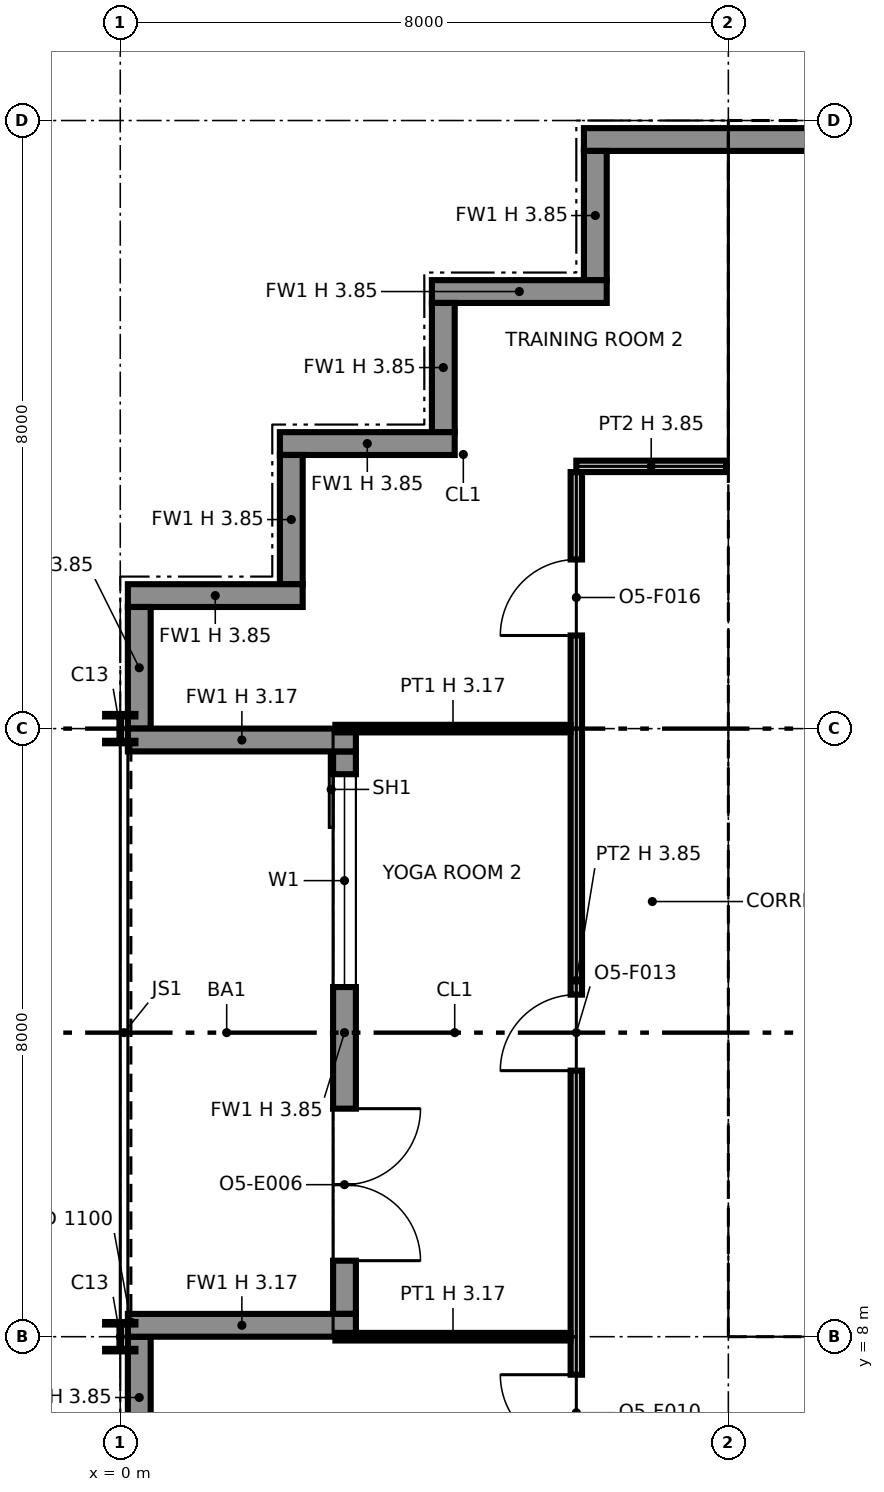
"""IFC4 building model, lengths in metres.
Left out: names, types, materials, properties, quantities, classifications, styles, units other than length and angle.
Written with IfcOpenShell. Run it as: python <this file> out.ifc"""

import sys

from ifc_helpers import new_model, si_unit, direction, frame, frame_2d, origin, origin_2d, place, context, subcontext, project, spatial, polyline, rectangle, i_section, outline, extrude, element, fill, save


model = new_model("IFC4")
c1 = context("Model", 3, precision=1e-05, world=origin(), true_north=direction((0.0, 1.0)))
c2 = subcontext(c1, "Body", "Model", "MODEL_VIEW")
j1 = project(units=[si_unit("LENGTHUNIT", "METRE"), si_unit("PLANEANGLEUNIT", "RADIAN")], contexts=[c1])
p1 = place(None, origin())
s1 = spatial("IfcSite", under=j1, at=p1, CompositionType="ELEMENT")
p2 = place(p1, origin())
s2 = spatial("IfcBuilding", under=s1, at=p2, CompositionType="ELEMENT")
p3 = place(p2, frame((0.0, 0.0, 225.0)))
s3 = spatial("IfcBuildingStorey", under=s2, at=p3, CompositionType="ELEMENT", Elevation=225.0)
for number, where, z_axis, x_axis in (
    (1, (0.0, 8.0, 0.0), (0.0, 0.0, 1.0), (1.0, 0.0, 0.0)),
    (2, (0.0, 16.0, 0.0), (0.0, 0.0, 1.0), (1.0, 0.0, 0.0)),
):
    element("IfcColumn", number, at=place(p3, frame(where, z_axis=z_axis, x_axis=x_axis)), inside=s3, PredefinedType="COLUMN", context=c2, shape_type="SweptSolid", body=[
        extrude(i_section(OverallWidth=0.399, OverallDepth=0.386, WebThickness=0.021, FlangeThickness=0.033, at=origin_2d()), origin(), (0.0, 0.0, 1.0), 3.85),
    ])
for number, where, z_axis, x_axis in (
    (3, (8.0, 8.0, 0.0), (0.0, 0.0, 1.0), (1.0, 0.0, 0.0)),
    (4, (8.0, 16.0, 0.0), (0.0, 0.0, 1.0), (1.0, 0.0, 0.0)),
):
    element("IfcColumn", number, at=place(p3, frame(where, z_axis=z_axis, x_axis=x_axis)), inside=s3, PredefinedType="COLUMN", context=c2, shape_type="SweptSolid", body=[
        extrude(i_section(OverallWidth=0.373, OverallDepth=0.368, WebThickness=0.015, FlangeThickness=0.024, at=origin_2d()), origin(), (0.0, 0.0, 1.0), 3.85),
    ])
p4 = place(p3, frame((8.0, 24.0, 0.0), z_axis=(0.0, 0.0, 1.0), x_axis=(1.0, 0.0, 0.0)))
e5 = element("IfcColumn", 5, at=p4, inside=s3, PredefinedType="COLUMN", context=c2, shape_type="SweptSolid", body=[
    extrude(i_section(OverallWidth=0.406, OverallDepth=0.417, WebThickness=0.03, FlangeThickness=0.048, at=origin_2d()), origin(), (0.0, 0.0, 1.0), 3.85),
])
p5 = place(p3, frame((32.0, 23.75, 0.0), z_axis=(0.0, 0.0, 1.0), x_axis=(-1.0, 0.0, 0.0)))
e6 = element("IfcWall", 6, at=p5, inside=s3, PredefinedType="SOLIDWALL", context=c2, shape_type="SweptSolid", body=[
    extrude(rectangle(XDim=25.9, YDim=0.3, at=frame_2d((12.95, 0.0))), origin(), (0.0, 0.0, 1.0), 3.85),
])
p6 = place(p3, frame((6.25, 23.6, 0.0), z_axis=(0.0, 0.0, 1.0), x_axis=(0.0, -1.0, 0.0)))
e7 = element("IfcWall", 7, at=p6, inside=s3, PredefinedType="SOLIDWALL", context=c2, shape_type="SweptSolid", body=[
    extrude(rectangle(XDim=1.7, YDim=0.3, at=frame_2d((0.85, 0.0))), origin(), (0.0, 0.0, 1.0), 3.85),
])
p7 = place(p3, frame((6.4, 21.75, 0.0), z_axis=(0.0, 0.0, 1.0), x_axis=(-1.0, 0.0, 0.0)))
e8 = element("IfcWall", 8, at=p7, inside=s3, PredefinedType="SOLIDWALL", context=c2, shape_type="SweptSolid", body=[
    extrude(rectangle(XDim=2.3, YDim=0.3, at=frame_2d((1.15, 0.0))), origin(), (0.0, 0.0, 1.0), 3.85),
])
p8 = place(p3, frame((4.25, 21.6, 0.0), z_axis=(0.0, 0.0, 1.0), x_axis=(0.0, -1.0, 0.0)))
e9 = element("IfcWall", 9, at=p8, inside=s3, PredefinedType="SOLIDWALL", context=c2, shape_type="SweptSolid", body=[
    extrude(rectangle(XDim=1.7, YDim=0.3, at=frame_2d((0.85, 0.0))), origin(), (0.0, 0.0, 1.0), 3.85),
])
p9 = place(p3, frame((4.4, 19.75, 0.0), z_axis=(0.0, 0.0, 1.0), x_axis=(-1.0, 0.0, 0.0)))
e10 = element("IfcWall", 10, at=p9, inside=s3, PredefinedType="SOLIDWALL", context=c2, shape_type="SweptSolid", body=[
    extrude(rectangle(XDim=2.3, YDim=0.3, at=frame_2d((1.15, 0.0))), origin(), (0.0, 0.0, 1.0), 3.85),
])
p10 = place(p3, frame((2.25, 19.6, 0.0), z_axis=(0.0, 0.0, 1.0), x_axis=(0.0, -1.0, 0.0)))
e11 = element("IfcWall", 11, at=p10, inside=s3, PredefinedType="SOLIDWALL", context=c2, shape_type="SweptSolid", body=[
    extrude(rectangle(XDim=1.7, YDim=0.3, at=frame_2d((0.85, 0.0))), origin(), (0.0, 0.0, 1.0), 3.85),
])
p11 = place(p3, frame((2.4, 17.75, 0.0), z_axis=(0.0, 0.0, 1.0), x_axis=(-1.0, 0.0, 0.0)))
e12 = element("IfcWall", 12, at=p11, inside=s3, PredefinedType="SOLIDWALL", context=c2, shape_type="SweptSolid", body=[
    extrude(rectangle(XDim=2.3, YDim=0.3, at=frame_2d((1.15, 0.0))), origin(), (0.0, 0.0, 1.0), 3.85),
])
p12 = place(p3, frame((0.25, 17.6, 0.0), z_axis=(0.0, 0.0, 1.0), x_axis=(0.0, -1.0, 0.0)))
e13 = element("IfcWall", 13, at=p12, inside=s3, PredefinedType="SOLIDWALL", context=c2, shape_type="SweptSolid", body=[
    extrude(rectangle(XDim=1.6, YDim=0.3, at=frame_2d((0.8, 0.0))), origin(), (0.0, 0.0, 1.0), 3.85),
])
p13 = place(p3, frame((2.95, 15.7, 0.0), z_axis=(0.0, 0.0, 1.0), x_axis=(0.0, -1.0, 0.0)))
e14 = element("IfcWall", 14, at=p13, inside=s3, PredefinedType="SOLIDWALL", context=c2, shape_type="SweptSolid", body=[
    extrude(rectangle(XDim=7.4, YDim=0.3, at=frame_2d((3.7, 0.0))), origin(), (0.0, 0.0, 1.0), 3.85),
])
p14 = place(p13, frame((0.3, 0.0, 0.9)))
e15 = element("IfcOpeningElement", 15, at=p14, cuts=e14, PredefinedType="OPENING", context=c2, shape_type="SweptSolid", body=[
    extrude(rectangle(XDim=2.8, YDim=2.2, at=frame_2d((1.4, 1.1))), frame((0.0, 0.16, 0.0), z_axis=(0.0, -1.0, 0.0), x_axis=(1.0, 0.0, 0.0)), (0.0, 0.0, 1.0), 0.32),
])
p15 = place(p13, frame((4.7, 0.0, 0.0)))
e16 = element("IfcOpeningElement", 16, at=p15, cuts=e14, PredefinedType="OPENING", context=c2, shape_type="SweptSolid", body=[
    extrude(rectangle(XDim=2.0, YDim=2.4, at=frame_2d((1.0, 1.2))), frame((0.0, 0.16, 0.0), z_axis=(0.0, -1.0, 0.0), x_axis=(1.0, 0.0, 0.0)), (0.0, 0.0, 1.0), 0.32),
])
for number, where, z_axis, x_axis in (
    (17, (0.1, 15.85, 0.0), (0.0, 0.0, 1.0), (1.0, 0.0, 0.0)),
    (18, (0.1, 8.15, 0.0), (0.0, 0.0, 1.0), (1.0, 0.0, 0.0)),
):
    element("IfcWall", number, at=place(p3, frame(where, z_axis=z_axis, x_axis=x_axis)), inside=s3, PredefinedType="SOLIDWALL", context=c2, shape_type="SweptSolid", body=[
        extrude(rectangle(XDim=3.0, YDim=0.3, at=frame_2d((1.5, 0.0))), origin(), (0.0, 0.0, 1.0), 3.171),
    ])
p16 = place(p3, frame((0.25, 8.0, 0.0), z_axis=(0.0, 0.0, 1.0), x_axis=(0.0, -1.0, 0.0)))
e19 = element("IfcWall", 19, at=p16, inside=s3, PredefinedType="SOLIDWALL", context=c2, shape_type="SweptSolid", body=[
    extrude(rectangle(XDim=1.6, YDim=0.3, at=frame_2d((0.8, 0.0))), origin(), (0.0, 0.0, 1.0), 3.85),
])
p17 = place(p3, frame((8.65, 8.75, 0.0), z_axis=(0.0, 0.0, 1.0), x_axis=(1.0, 0.0, 0.0)))
e20 = element("IfcWall", 20, at=p17, inside=s3, PredefinedType="PARTITIONING", context=c2, shape_type="SweptSolid", body=[
    extrude(outline(polyline([(0.0, 0.0), (14.7, 0.0), (14.7, 3.85), (7.438, 3.85), (7.438, 3.308), (7.262, 3.308), (7.261, 3.85), (0.0, 3.85), (0.0, 0.0)])), frame((0.0, 0.1, 0.0), z_axis=(0.0, -1.0, 0.0), x_axis=(1.0, 0.0, 0.0)), (0.0, 0.0, 1.0), 0.2),
])
p18 = place(p17, frame((1.3, 0.0, 0.0)))
e21 = element("IfcOpeningElement", 21, at=p18, cuts=e20, PredefinedType="OPENING", context=c2, shape_type="SweptSolid", body=[
    extrude(rectangle(XDim=1.4, YDim=2.1, at=frame_2d((0.7, 1.05))), frame((0.0, 0.11, 0.0), z_axis=(0.0, -1.0, 0.0), x_axis=(1.0, 0.0, 0.0)), (0.0, 0.0, 1.0), 0.22),
])
p19 = place(p17, frame((4.6, 0.0, 0.0)))
e22 = element("IfcOpeningElement", 22, at=p19, cuts=e20, PredefinedType="OPENING", context=c2, shape_type="SweptSolid", body=[
    extrude(rectangle(XDim=1.4, YDim=2.1, at=frame_2d((0.7, 1.05))), frame((0.0, 0.11, 0.0), z_axis=(0.0, -1.0, 0.0), x_axis=(1.0, 0.0, 0.0)), (0.0, 0.0, 1.0), 0.22),
])
p20 = place(p17, frame((10.4, 0.0, 0.0)))
e23 = element("IfcOpeningElement", 23, at=p20, cuts=e20, PredefinedType="OPENING", context=c2, shape_type="SweptSolid", body=[
    extrude(rectangle(XDim=1.2, YDim=2.1, at=frame_2d((0.6, 1.05))), frame((0.0, 0.11, 0.0), z_axis=(0.0, -1.0, 0.0), x_axis=(1.0, 0.0, 0.0)), (0.0, 0.0, 1.0), 0.22),
])
p21 = place(p3, frame((8.75, 8.85, 0.0), z_axis=(0.0, 0.0, 1.0), x_axis=(0.0, 1.0, 0.0)))
e24 = element("IfcWall", 24, at=p21, inside=s3, PredefinedType="PARTITIONING", context=c2, shape_type="SweptSolid", body=[
    extrude(outline(polyline([(0.0, 0.0), (14.3, 0.0), (14.3, 3.85), (10.225, 3.85), (10.224, 3.44), (10.076, 3.44), (10.075, 3.85), (7.239, 3.85), (7.238, 3.308), (7.062, 3.308), (7.062, 3.85), (0.0, 3.85), (0.0, 0.0)])), frame((0.0, 0.1, 0.0), z_axis=(0.0, -1.0, 0.0), x_axis=(1.0, 0.0, 0.0)), (0.0, 0.0, 1.0), 0.2),
])
p22 = place(p21, frame((8.3, 0.0, 0.0)))
e25 = element("IfcOpeningElement", 25, at=p22, cuts=e24, PredefinedType="OPENING", context=c2, shape_type="SweptSolid", body=[
    extrude(rectangle(XDim=1.8, YDim=2.1, at=frame_2d((0.9, 1.05))), frame((0.0, 0.11, 0.0), z_axis=(0.0, -1.0, 0.0), x_axis=(1.0, 0.0, 0.0)), (0.0, 0.0, 1.0), 0.22),
])
p23 = place(p3, frame((8.65, 23.25, 0.0), z_axis=(0.0, 0.0, 1.0), x_axis=(1.0, 0.0, 0.0)))
e26 = element("IfcWall", 26, at=p23, inside=s3, PredefinedType="PARTITIONING", context=c2, shape_type="SweptSolid", body=[
    extrude(outline(polyline([(0.0, 0.0), (14.7, 0.0), (14.7, 3.85), (7.438, 3.85), (7.438, 3.308), (7.262, 3.308), (7.261, 3.85), (0.0, 3.85), (0.0, 0.0)])), frame((0.0, 0.1, 0.0), z_axis=(0.0, -1.0, 0.0), x_axis=(1.0, 0.0, 0.0)), (0.0, 0.0, 1.0), 0.2),
])
p24 = place(p3, frame((8.85, 16.0, 0.0), z_axis=(0.0, 0.0, 1.0), x_axis=(1.0, 0.0, 0.0)))
e27 = element("IfcWall", 27, at=p24, inside=s3, PredefinedType="PARTITIONING", context=c2, shape_type="SweptSolid", body=[
    extrude(rectangle(XDim=6.953, YDim=0.6, at=frame_2d((3.477, 0.0))), origin(), (0.0, 0.0, 1.0), 3.308),
])
p25 = place(p3, frame((8.85, 19.9, 0.0), z_axis=(0.0, 0.0, 1.0), x_axis=(1.0, 0.0, 0.0)))
e28 = element("IfcWall", 28, at=p25, inside=s3, PredefinedType="PARTITIONING", context=c2, shape_type="SweptSolid", body=[
    extrude(outline(polyline([(0.0, 0.0), (14.3, 0.0), (14.3, 3.85), (7.239, 3.85), (7.238, 3.308), (7.062, 3.308), (7.062, 3.85), (0.0, 3.85), (0.0, 0.0)])), frame((0.0, 0.1, 0.0), z_axis=(0.0, -1.0, 0.0), x_axis=(1.0, 0.0, 0.0)), (0.0, 0.0, 1.0), 0.2),
])
p26 = place(p25, frame((2.125, 0.0, 0.0)))
e29 = element("IfcOpeningElement", 29, at=p26, cuts=e28, PredefinedType="OPENING", context=c2, shape_type="SweptSolid", body=[
    extrude(rectangle(XDim=0.9, YDim=2.1, at=frame_2d((0.45, 1.05))), frame((0.0, 0.11, 0.0), z_axis=(0.0, -1.0, 0.0), x_axis=(1.0, 0.0, 0.0)), (0.0, 0.0, 1.0), 0.22),
])
p27 = place(p25, frame((5.65, 0.0, 0.0)))
e30 = element("IfcOpeningElement", 30, at=p27, cuts=e28, PredefinedType="OPENING", context=c2, shape_type="SweptSolid", body=[
    extrude(rectangle(XDim=1.1, YDim=2.1, at=frame_2d((0.55, 1.05))), frame((0.0, 0.11, 0.0), z_axis=(0.0, -1.0, 0.0), x_axis=(1.0, 0.0, 0.0)), (0.0, 0.0, 1.0), 0.22),
])
p28 = place(p25, frame((7.95, 0.0, 0.0)))
e31 = element("IfcOpeningElement", 31, at=p28, cuts=e28, PredefinedType="OPENING", context=c2, shape_type="SweptSolid", body=[
    extrude(rectangle(XDim=1.1, YDim=2.1, at=frame_2d((0.55, 1.05))), frame((0.0, 0.11, 0.0), z_axis=(0.0, -1.0, 0.0), x_axis=(1.0, 0.0, 0.0)), (0.0, 0.0, 1.0), 0.22),
])
p29 = place(p25, frame((10.25, 0.0, 0.0)))
e32 = element("IfcOpeningElement", 32, at=p29, cuts=e28, PredefinedType="OPENING", context=c2, shape_type="SweptSolid", body=[
    extrude(rectangle(XDim=1.1, YDim=2.1, at=frame_2d((0.55, 1.05))), frame((0.0, 0.11, 0.0), z_axis=(0.0, -1.0, 0.0), x_axis=(1.0, 0.0, 0.0)), (0.0, 0.0, 1.0), 0.22),
])
p30 = place(p25, frame((12.625, 0.0, 0.0)))
e33 = element("IfcOpeningElement", 33, at=p30, cuts=e28, PredefinedType="OPENING", context=c2, shape_type="SweptSolid", body=[
    extrude(rectangle(XDim=1.1, YDim=2.1, at=frame_2d((0.55, 1.05))), frame((0.0, 0.11, 0.0), z_axis=(0.0, -1.0, 0.0), x_axis=(1.0, 0.0, 0.0)), (0.0, 0.0, 1.0), 0.22),
])
p31 = place(p3, frame((6.0, 6.0, 0.0), z_axis=(0.0, 0.0, 1.0), x_axis=(0.0, 1.0, 0.0)))
e34 = element("IfcWall", 34, at=p31, inside=s3, PredefinedType="PARTITIONING", context=c2, shape_type="SweptSolid", body=[
    extrude(outline(polyline([(0.0, 0.0), (13.375, 0.0), (13.375, 3.85), (10.3, 3.85), (10.298, 3.172), (9.702, 3.172), (9.7, 3.85), (6.3, 3.85), (6.298, 3.172), (5.702, 3.172), (5.7, 3.85), (2.3, 3.85), (2.298, 3.172), (1.702, 3.172), (1.7, 3.85), (0.0, 3.85), (0.0, 0.0)])), frame((0.0, 0.075, 0.0), z_axis=(0.0, -1.0, 0.0), x_axis=(1.0, 0.0, 0.0)), (0.0, 0.0, 1.0), 0.15),
])
p32 = place(p31, frame((0.5, 0.0, 0.0)))
e35 = element("IfcOpeningElement", 35, at=p32, cuts=e34, PredefinedType="OPENING", context=c2, shape_type="SweptSolid", body=[
    extrude(rectangle(XDim=1.0, YDim=2.1, at=frame_2d((0.5, 1.05))), frame((0.0, 0.085, 0.0), z_axis=(0.0, -1.0, 0.0), x_axis=(1.0, 0.0, 0.0)), (0.0, 0.0, 1.0), 0.17),
])
p33 = place(p31, frame((5.5, 0.0, 0.0)))
e36 = element("IfcOpeningElement", 36, at=p33, cuts=e34, PredefinedType="OPENING", context=c2, shape_type="SweptSolid", body=[
    extrude(rectangle(XDim=1.0, YDim=2.1, at=frame_2d((0.5, 1.05))), frame((0.0, 0.085, 0.0), z_axis=(0.0, -1.0, 0.0), x_axis=(1.0, 0.0, 0.0)), (0.0, 0.0, 1.0), 0.17),
])
p34 = place(p31, frame((11.225, 0.0, 0.0)))
e37 = element("IfcOpeningElement", 37, at=p34, cuts=e34, PredefinedType="OPENING", context=c2, shape_type="SweptSolid", body=[
    extrude(rectangle(XDim=1.0, YDim=2.1, at=frame_2d((0.5, 1.05))), frame((0.0, 0.085, 0.0), z_axis=(0.0, -1.0, 0.0), x_axis=(1.0, 0.0, 0.0)), (0.0, 0.0, 1.0), 0.17),
])
for number, where, z_axis, x_axis in (
    (38, (2.83, 8.0, 0.0), (0.0, 0.0, 1.0), (1.0, 0.0, 0.0)),
    (39, (2.83, 16.0, 0.0), (0.0, 0.0, 1.0), (1.0, 0.0, 0.0)),
):
    element("IfcWall", number, at=place(p3, frame(where, z_axis=z_axis, x_axis=x_axis)), inside=s3, PredefinedType="PARTITIONING", context=c2, shape_type="SweptSolid", body=[
        extrude(rectangle(XDim=3.095, YDim=0.1, at=frame_2d((1.547, 0.0))), origin(), (0.0, 0.0, 1.0), 3.172),
    ])
p35 = place(p3, frame((6.0, 19.45, 0.0), z_axis=(0.0, 0.0, 1.0), x_axis=(1.0, 0.0, 0.0)))
e40 = element("IfcWall", 40, at=p35, inside=s3, PredefinedType="PARTITIONING", context=c2, shape_type="SweptSolid", body=[
    extrude(rectangle(XDim=1.97, YDim=0.15, at=frame_2d((0.985, 0.0))), origin(), (0.0, 0.0, 1.0), 3.85),
])
p36 = place(p14, origin())
e41 = element("IfcWindow", 41, at=p36, inside=s3, PartitioningType="SINGLE_PANEL", PredefinedType="WINDOW", context=c2, shape_type="SweptSolid", body=[
    extrude(rectangle(XDim=2.8, YDim=2.2, at=frame_2d((1.4, 1.1))), frame((0.0, 0.03, 0.0), z_axis=(0.0, -1.0, 0.0), x_axis=(1.0, 0.0, 0.0)), (0.0, 0.0, 1.0), 0.06),
])
fill(e15, e41)
p37 = place(p15, origin())
e42 = element("IfcDoor", 42, at=p37, inside=s3, OperationType="DOUBLE_DOOR_SINGLE_SWING", PredefinedType="DOOR", context=c2, shape_type="SweptSolid", body=[
    extrude(rectangle(XDim=2.0, YDim=2.4, at=frame_2d((1.0, 1.2))), frame((0.0, 0.025, 0.0), z_axis=(0.0, -1.0, 0.0), x_axis=(1.0, 0.0, 0.0)), (0.0, 0.0, 1.0), 0.05),
])
fill(e16, e42)
p38 = place(p22, origin())
e43 = element("IfcDoor", 43, at=p38, inside=s3, OperationType="DOUBLE_DOOR_SINGLE_SWING", PredefinedType="NOTDEFINED", context=c2, shape_type="SweptSolid", body=[
    extrude(rectangle(XDim=1.8, YDim=2.1, at=frame_2d((0.9, 1.05))), frame((0.0, 0.025, 0.0), z_axis=(0.0, -1.0, 0.0), x_axis=(1.0, 0.0, 0.0)), (0.0, 0.0, 1.0), 0.05),
])
fill(e25, e43)
p39 = place(p32, origin())
e44 = element("IfcDoor", 44, at=p39, inside=s3, OperationType="SINGLE_SWING_RIGHT", PredefinedType="DOOR", context=c2, shape_type="SweptSolid", body=[
    extrude(rectangle(XDim=1.0, YDim=2.1, at=frame_2d((0.5, 1.05))), frame((0.0, 0.025, 0.0), z_axis=(0.0, -1.0, 0.0), x_axis=(1.0, 0.0, 0.0)), (0.0, 0.0, 1.0), 0.05),
])
fill(e35, e44)
p40 = place(p33, origin())
e45 = element("IfcDoor", 45, at=p40, inside=s3, OperationType="SINGLE_SWING_LEFT", PredefinedType="DOOR", context=c2, shape_type="SweptSolid", body=[
    extrude(rectangle(XDim=1.0, YDim=2.1, at=frame_2d((0.5, 1.05))), frame((0.0, 0.025, 0.0), z_axis=(0.0, -1.0, 0.0), x_axis=(1.0, 0.0, 0.0)), (0.0, 0.0, 1.0), 0.05),
])
fill(e36, e45)
p41 = place(p34, origin())
e46 = element("IfcDoor", 46, at=p41, inside=s3, OperationType="SINGLE_SWING_LEFT", PredefinedType="DOOR", context=c2, shape_type="SweptSolid", body=[
    extrude(rectangle(XDim=1.0, YDim=2.1, at=frame_2d((0.5, 1.05))), frame((0.0, 0.025, 0.0), z_axis=(0.0, -1.0, 0.0), x_axis=(1.0, 0.0, 0.0)), (0.0, 0.0, 1.0), 0.05),
])
fill(e37, e46)
save(model, sys.argv[1])
